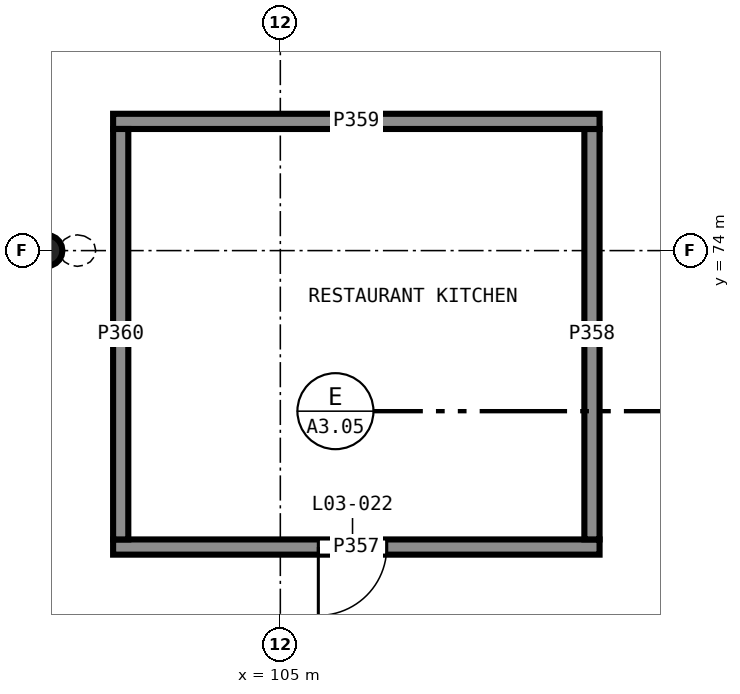
"""IFC4 building model, lengths in metres.
Left out: names, types, materials, properties, quantities, classifications, styles, units other than length and angle.
Written with IfcOpenShell. Run it as: python <this file> out.ifc"""

import sys

from ifc_helpers import new_model, si_unit, direction, frame, frame_2d, origin, origin_2d, place, context, subcontext, project, spatial, rectangle, hollow_circle, extrude, element, fill, save


model = new_model("IFC4")
c1 = context("Model", 3, precision=1e-05, world=origin(), true_north=direction((0.0, 1.0)))
c2 = subcontext(c1, "Body", "Model", "MODEL_VIEW")
j1 = project(units=[si_unit("LENGTHUNIT", "METRE"), si_unit("PLANEANGLEUNIT", "RADIAN")], contexts=[c1])
p1 = place(None, origin())
s1 = spatial("IfcSite", under=j1, at=p1, CompositionType="ELEMENT")
p2 = place(p1, origin())
s2 = spatial("IfcBuilding", under=s1, at=p2, CompositionType="ELEMENT")
p3 = place(p2, frame((0.0, 0.0, 13.5)))
s3 = spatial("IfcBuildingStorey", under=s2, at=p3, CompositionType="ELEMENT", Elevation=13.5)
p4 = place(p3, frame((102.3, 74.0, 0.0), z_axis=(-0.196116135138, 0.0, 0.980580675691), x_axis=(0.0, -1.0, 0.0)))
e1 = element("IfcColumn", 1, at=p4, inside=s3, PredefinedType="COLUMN", context=c2, shape_type="SweptSolid", body=[
    extrude(hollow_circle(Radius=0.203, WallThickness=0.013, at=origin_2d()), origin(), (0.0, 0.0, 1.0), 3.773),
])
p5 = place(p3, frame((102.8, 70.1, 0.0), z_axis=(0.0, 0.0, 1.0), x_axis=(1.0, 0.0, 0.0)))
e2 = element("IfcWall", 2, at=p5, inside=s3, PredefinedType="PARTITIONING", context=c2, shape_type="SweptSolid", body=[
    extrude(rectangle(XDim=6.4, YDim=0.2, at=frame_2d((3.2, 0.0))), origin(), (0.0, 0.0, 1.0), 3.7),
])
p6 = place(p5, frame((2.7, 0.0, 0.0)))
e3 = element("IfcOpeningElement", 3, at=p6, cuts=e2, PredefinedType="OPENING", context=c2, shape_type="SweptSolid", body=[
    extrude(rectangle(XDim=0.9, YDim=2.1, at=frame_2d((0.45, 1.05))), frame((0.0, 0.11, 0.0), z_axis=(0.0, -1.0, 0.0), x_axis=(1.0, 0.0, 0.0)), (0.0, 0.0, 1.0), 0.22),
])
p7 = place(p3, frame((109.1, 70.2, 0.0), z_axis=(0.0, 0.0, 1.0), x_axis=(0.0, 1.0, 0.0)))
e4 = element("IfcWall", 4, at=p7, inside=s3, PredefinedType="PARTITIONING", context=c2, shape_type="SweptSolid", body=[
    extrude(rectangle(XDim=5.4, YDim=0.2, at=frame_2d((2.7, 0.0))), origin(), (0.0, 0.0, 1.0), 3.7),
])
p8 = place(p3, frame((109.2, 75.7, 0.0), z_axis=(0.0, 0.0, 1.0), x_axis=(-1.0, 0.0, 0.0)))
e5 = element("IfcWall", 5, at=p8, inside=s3, PredefinedType="PARTITIONING", context=c2, shape_type="SweptSolid", body=[
    extrude(rectangle(XDim=6.4, YDim=0.2, at=frame_2d((3.2, 0.0))), origin(), (0.0, 0.0, 1.0), 3.7),
])
p9 = place(p3, frame((102.9, 75.6, 0.0), z_axis=(0.0, 0.0, 1.0), x_axis=(0.0, -1.0, 0.0)))
e6 = element("IfcWall", 6, at=p9, inside=s3, PredefinedType="PARTITIONING", context=c2, shape_type="SweptSolid", body=[
    extrude(rectangle(XDim=5.4, YDim=0.2, at=frame_2d((2.7, 0.0))), origin(), (0.0, 0.0, 1.0), 3.7),
])
p10 = place(p6, frame((0.9, 0.0, 0.0), z_axis=(0.0, 0.0, 1.0), x_axis=(-1.0, 0.0, 0.0)))
e7 = element("IfcDoor", 7, at=p10, inside=s3, OperationType="SINGLE_SWING_LEFT", PredefinedType="DOOR", context=c2, shape_type="SweptSolid", body=[
    extrude(rectangle(XDim=0.9, YDim=2.1, at=frame_2d((0.45, 1.05))), frame((0.0, 0.025, 0.0), z_axis=(0.0, -1.0, 0.0), x_axis=(1.0, 0.0, 0.0)), (0.0, 0.0, 1.0), 0.05),
])
fill(e3, e7)
save(model, sys.argv[1])
